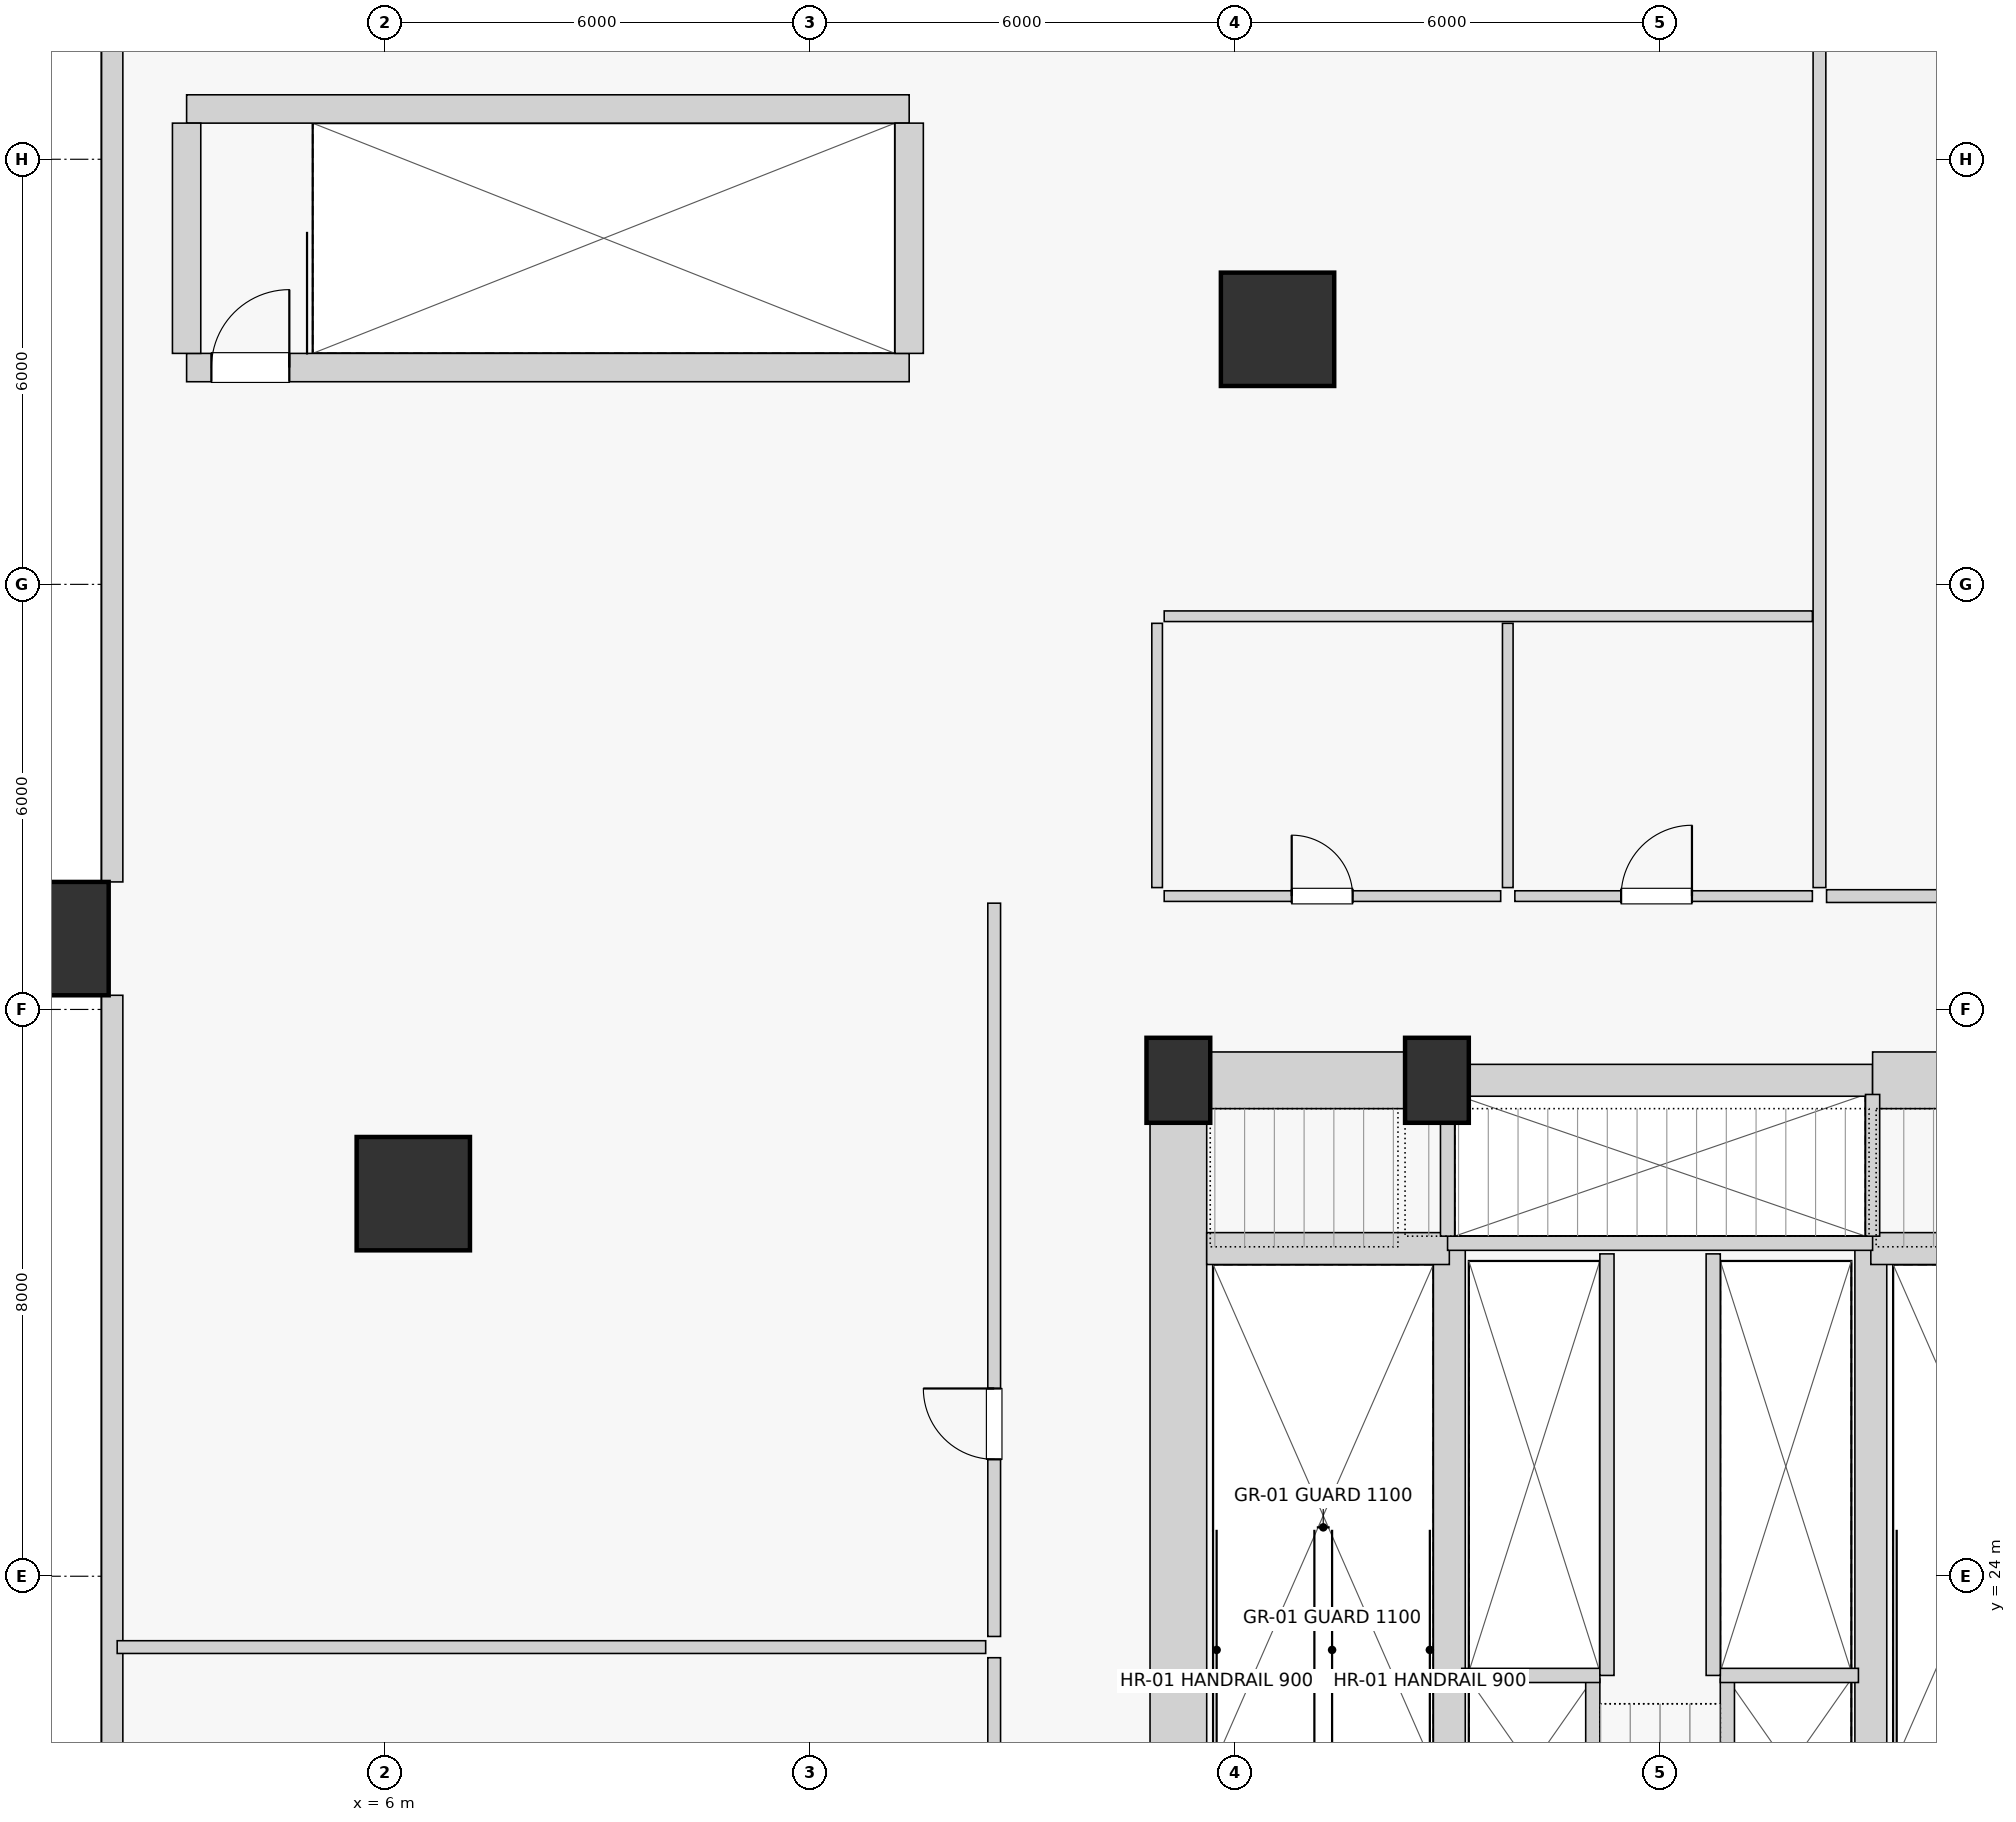
"""IFC4 building model, lengths in metres.
Left out: names, types, materials, properties, quantities, classifications, styles, units other than length and angle.
Written with IfcOpenShell. Run it as: python <this file> out.ifc"""

import sys

from ifc_helpers import new_model, si_unit, direction, frame, frame_2d, origin, origin_2d, place, context, subcontext, project, spatial, rectangle, extrude, source, transform, mapped, element, fill, save


model = new_model("IFC4")
c1 = context("Model", 3, precision=1e-05, world=origin(), true_north=direction((0.0, 1.0)))
c2 = subcontext(c1, "Body", "Model", "MODEL_VIEW")
j1 = project(units=[si_unit("LENGTHUNIT", "METRE"), si_unit("PLANEANGLEUNIT", "RADIAN")], contexts=[c1])
p1 = place(None, origin())
s1 = spatial("IfcSite", under=j1, at=p1, CompositionType="ELEMENT")
p2 = place(p1, origin())
s2 = spatial("IfcBuilding", under=s1, at=p2, CompositionType="ELEMENT")
p3 = place(p2, frame((0.0, 0.0, 18.4)))
s3 = spatial("IfcBuildingStorey", under=s2, at=p3, CompositionType="ELEMENT", Elevation=18.4)
for number, where, z_axis, x_axis in (
    (1, (17.2, 31.0, 0.0), (0.0, 0.0, 1.0), (1.0, 0.0, 0.0)),
    (2, (20.85, 31.0, 0.0), (0.0, 0.0, 1.0), (1.0, 0.0, 0.0)),
):
    element("IfcColumn", number, at=place(p3, frame(where, z_axis=z_axis, x_axis=x_axis)), inside=s3, PredefinedType="PILASTER", context=c2, shape_type="SweptSolid", body=[
        extrude(rectangle(XDim=0.9, YDim=1.2, at=origin_2d()), origin(), (0.0, 0.0, 1.0), 4.4),
    ])
for number, where, z_axis, x_axis in (
    (3, (1.3, 33.0, 0.0), (0.0, 0.0, 1.0), (1.0, 0.0, 0.0)),
    (4, (18.6, 41.6, 0.0), (0.0, 0.0, 1.0), (1.0, 0.0, 0.0)),
    (5, (6.4, 29.4, 0.0), (0.0, 0.0, 1.0), (1.0, 0.0, 0.0)),
):
    element("IfcColumn", number, at=place(p3, frame(where, z_axis=z_axis, x_axis=x_axis)), inside=s3, PredefinedType="COLUMN", context=c2, shape_type="SweptSolid", body=[
        extrude(rectangle(XDim=1.6, YDim=1.6, at=origin_2d()), origin(), (0.0, 0.0, 1.0), 4.4),
    ])
p4 = place(p3, frame((2.15, 45.7, 0.0), z_axis=(0.0, 0.0, 1.0), x_axis=(0.0, -1.0, 0.0)))
e6 = element("IfcWall", 6, at=p4, inside=s3, PredefinedType="SOLIDWALL", context=c2, shape_type="SweptSolid", body=[
    extrude(rectangle(XDim=11.9, YDim=0.3, at=frame_2d((5.95, 0.0))), origin(), (0.0, 0.0, 1.0), 2.95),
])
p5 = place(p4, frame((5.05, 0.0, 0.85)))
e7 = element("IfcOpeningElement", 7, at=p5, cuts=e6, PredefinedType="OPENING", context=c2, shape_type="SweptSolid", body=[
    extrude(rectangle(XDim=2.1, YDim=1.75, at=frame_2d((1.05, 0.875))), frame((0.0, 0.16, 0.0), z_axis=(0.0, -1.0, 0.0), x_axis=(1.0, 0.0, 0.0)), (0.0, 0.0, 1.0), 0.32),
])
p6 = place(p3, frame((2.15, 32.2, 0.0), z_axis=(0.0, 0.0, 1.0), x_axis=(0.0, -1.0, 0.0)))
e8 = element("IfcWall", 8, at=p6, inside=s3, PredefinedType="SOLIDWALL", context=c2, shape_type="SweptSolid", body=[
    extrude(rectangle(XDim=16.4, YDim=0.3, at=frame_2d((8.2, 0.0))), origin(), (0.0, 0.0, 1.0), 2.95),
])
p7 = place(p6, frame((7.15, 0.0, 0.85)))
e9 = element("IfcOpeningElement", 9, at=p7, cuts=e8, PredefinedType="OPENING", context=c2, shape_type="SweptSolid", body=[
    extrude(rectangle(XDim=2.1, YDim=1.75, at=frame_2d((1.05, 0.875))), frame((0.0, 0.16, 0.0), z_axis=(0.0, -1.0, 0.0), x_axis=(1.0, 0.0, 0.0)), (0.0, 0.0, 1.0), 0.32),
])
p8 = place(p3, frame((17.2, 16.8, 0.0), z_axis=(0.0, 0.0, 1.0), x_axis=(0.0, 1.0, 0.0)))
e10 = element("IfcWall", 10, at=p8, inside=s3, PredefinedType="SHEAR", context=c2, shape_type="SweptSolid", body=[
    extrude(rectangle(XDim=14.2, YDim=0.8, at=frame_2d((7.1, 0.0))), origin(), (0.0, 0.0, 1.0), 4.05),
])
p9 = place(p3, frame((17.2, 31.0, 0.0), z_axis=(0.0, 0.0, 1.0), x_axis=(1.0, 0.0, 0.0)))
e11 = element("IfcWall", 11, at=p9, inside=s3, PredefinedType="SHEAR", context=c2, shape_type="SweptSolid", body=[
    extrude(rectangle(XDim=3.8, YDim=0.8, at=frame_2d((1.9, 0.0))), origin(), (0.0, 0.0, 1.0), 4.05),
])
p10 = place(p3, frame((21.0, 31.0, 0.0), z_axis=(0.0, 0.0, 1.0), x_axis=(1.0, 0.0, 0.0)))
e12 = element("IfcWall", 12, at=p10, inside=s3, PredefinedType="SHEAR", context=c2, shape_type="SweptSolid", body=[
    extrude(rectangle(XDim=6.0, YDim=0.45, at=frame_2d((3.0, 0.0))), origin(), (0.0, 0.0, 1.0), 4.05),
])
p11 = place(p3, frame((27.0, 31.0, 0.0), z_axis=(0.0, 0.0, 1.0), x_axis=(1.0, 0.0, 0.0)))
e13 = element("IfcWall", 13, at=p11, inside=s3, PredefinedType="SHEAR", context=c2, shape_type="SweptSolid", body=[
    extrude(rectangle(XDim=3.8, YDim=0.8, at=frame_2d((1.9, 0.0))), origin(), (0.0, 0.0, 1.0), 4.05),
])
for number, where, z_axis, x_axis in (
    (14, (21.025, 19.8, 0.0), (0.0, 0.0, 1.0), (0.0, 1.0, 0.0)),
    (15, (26.975, 19.8, 0.0), (0.0, 0.0, 1.0), (0.0, 1.0, 0.0)),
):
    element("IfcWall", number, at=place(p3, frame(where, z_axis=z_axis, x_axis=x_axis)), inside=s3, PredefinedType="SHEAR", context=c2, shape_type="SweptSolid", body=[
        extrude(rectangle(XDim=8.825, YDim=0.45, at=frame_2d((4.413, 0.0))), origin(), (0.0, 0.0, 1.0), 4.05),
    ])
for number, where, z_axis, x_axis in (
    (16, (17.6, 28.625, 0.0), (0.0, 0.0, 1.0), (1.0, 0.0, 0.0)),
    (17, (26.975, 28.625, 0.0), (0.0, 0.0, 1.0), (1.0, 0.0, 0.0)),
):
    element("IfcWall", number, at=place(p3, frame(where, z_axis=z_axis, x_axis=x_axis)), inside=s3, PredefinedType="SHEAR", context=c2, shape_type="SweptSolid", body=[
        extrude(rectangle(XDim=3.425, YDim=0.45, at=frame_2d((1.712, 0.0))), origin(), (0.0, 0.0, 1.0), 4.05),
    ])
for number, where, z_axis, x_axis in (
    (18, (23.05, 16.95, 0.0), (0.0, 0.0, 1.0), (0.0, 1.0, 0.0)),
    (19, (24.95, 16.95, 0.0), (0.0, 0.0, 1.0), (0.0, 1.0, 0.0)),
):
    element("IfcWall", number, at=place(p3, frame(where, z_axis=z_axis, x_axis=x_axis)), inside=s3, PredefinedType="SOLIDWALL", context=c2, shape_type="SweptSolid", body=[
        extrude(rectangle(XDim=5.6, YDim=0.2, at=frame_2d((2.8, 0.0))), origin(), (0.0, 0.0, 1.0), 4.05),
    ])
for number, where, z_axis, x_axis in (
    (20, (21.2, 22.6, 0.0), (0.0, 0.0, 1.0), (1.0, 0.0, 0.0)),
    (21, (24.85, 22.6, 0.0), (0.0, 0.0, 1.0), (1.0, 0.0, 0.0)),
):
    element("IfcWall", number, at=place(p3, frame(where, z_axis=z_axis, x_axis=x_axis)), inside=s3, PredefinedType="SOLIDWALL", context=c2, shape_type="SweptSolid", body=[
        extrude(rectangle(XDim=1.95, YDim=0.2, at=frame_2d((0.975, 0.0))), origin(), (0.0, 0.0, 1.0), 4.05),
    ])
p12 = place(p3, frame((21.0, 28.7, 0.0), z_axis=(0.0, 0.0, 1.0), x_axis=(1.0, 0.0, 0.0)))
e22 = element("IfcWall", 22, at=p12, inside=s3, PredefinedType="SOLIDWALL", context=c2, shape_type="SweptSolid", body=[
    extrude(rectangle(XDim=6.0, YDim=0.2, at=frame_2d((3.0, 0.0))), origin(), (0.0, 0.0, 1.0), 4.05),
])
p13 = place(p3, frame((21.0, 28.8, 0.0), z_axis=(0.0, 0.0, 1.0), x_axis=(0.0, 1.0, 0.0)))
e23 = element("IfcWall", 23, at=p13, inside=s3, PredefinedType="SOLIDWALL", context=c2, shape_type="SweptSolid", body=[
    extrude(rectangle(XDim=1.6, YDim=0.2, at=frame_2d((0.8, 0.0))), origin(), (0.0, 0.0, 1.0), 4.05),
])
p14 = place(p3, frame((27.0, 28.8, 0.0), z_axis=(0.0, 0.0, 1.0), x_axis=(0.0, 1.0, 0.0)))
e24 = element("IfcWall", 24, at=p14, inside=s3, PredefinedType="SOLIDWALL", context=c2, shape_type="SweptSolid", body=[
    extrude(rectangle(XDim=2.0, YDim=0.2, at=frame_2d((1.0, 0.0))), origin(), (0.0, 0.0, 1.0), 4.05),
])
for number, where, z_axis, x_axis in (
    (25, (23.25, 22.6, 0.0), (0.0, 0.0, 1.0), (0.0, 1.0, 0.0)),
    (26, (24.75, 22.6, 0.0), (0.0, 0.0, 1.0), (0.0, 1.0, 0.0)),
):
    element("IfcWall", number, at=place(p3, frame(where, z_axis=z_axis, x_axis=x_axis)), inside=s3, PredefinedType="SOLIDWALL", context=c2, shape_type="SweptSolid", body=[
        extrude(rectangle(XDim=5.95, YDim=0.2, at=frame_2d((2.975, 0.0))), origin(), (0.0, 0.0, 1.0), 4.05),
    ])
p15 = place(p3, frame((3.2, 41.06, 0.0), z_axis=(0.0, 0.0, 1.0), x_axis=(1.0, 0.0, 0.0)))
e27 = element("IfcWall", 27, at=p15, inside=s3, PredefinedType="SHEAR", context=c2, shape_type="SweptSolid", body=[
    extrude(rectangle(XDim=10.2, YDim=0.4, at=frame_2d((5.1, 0.0))), origin(), (0.0, 0.0, 1.0), 4.05),
])
p16 = place(p15, frame((0.35, 0.0, 0.0)))
e28 = element("IfcOpeningElement", 28, at=p16, cuts=e27, PredefinedType="OPENING", context=c2, shape_type="SweptSolid", body=[
    extrude(rectangle(XDim=1.1, YDim=2.03, at=frame_2d((0.55, 1.015))), frame((0.0, 0.21, 0.0), z_axis=(0.0, -1.0, 0.0), x_axis=(1.0, 0.0, 0.0)), (0.0, 0.0, 1.0), 0.42),
])
p17 = place(p3, frame((3.2, 44.71, 0.0), z_axis=(0.0, 0.0, 1.0), x_axis=(1.0, 0.0, 0.0)))
e29 = element("IfcWall", 29, at=p17, inside=s3, PredefinedType="SHEAR", context=c2, shape_type="SweptSolid", body=[
    extrude(rectangle(XDim=10.2, YDim=0.4, at=frame_2d((5.1, 0.0))), origin(), (0.0, 0.0, 1.0), 4.05),
])
for number, where, z_axis, x_axis in (
    (30, (3.2, 41.26, 0.0), (0.0, 0.0, 1.0), (0.0, 1.0, 0.0)),
    (31, (13.4, 41.26, 0.0), (0.0, 0.0, 1.0), (0.0, 1.0, 0.0)),
):
    element("IfcWall", number, at=place(p3, frame(where, z_axis=z_axis, x_axis=x_axis)), inside=s3, PredefinedType="SHEAR", context=c2, shape_type="SweptSolid", body=[
        extrude(rectangle(XDim=3.25, YDim=0.4, at=frame_2d((1.625, 0.0))), origin(), (0.0, 0.0, 1.0), 4.05),
    ])
p18 = place(p3, frame((14.6, 14.3, 0.0), z_axis=(0.0, 0.0, 1.0), x_axis=(0.0, 1.0, 0.0)))
e32 = element("IfcWall", 32, at=p18, inside=s3, PredefinedType="PARTITIONING", context=c2, shape_type="SweptSolid", body=[
    extrude(rectangle(XDim=8.55, YDim=0.18, at=frame_2d((4.275, 0.0))), origin(), (0.0, 0.0, 1.0), 4.05),
])
p19 = place(p18, frame((2.5, 0.0, 0.0)))
e33 = element("IfcOpeningElement", 33, at=p19, cuts=e32, PredefinedType="OPENING", context=c2, shape_type="SweptSolid", body=[
    extrude(rectangle(XDim=1.0, YDim=2.01, at=frame_2d((0.5, 1.005))), frame((0.0, 0.1, 0.0), z_axis=(0.0, -1.0, 0.0), x_axis=(1.0, 0.0, 0.0)), (0.0, 0.0, 1.0), 0.2),
])
p20 = place(p3, frame((14.6, 23.15, 0.0), z_axis=(0.0, 0.0, 1.0), x_axis=(0.0, 1.0, 0.0)))
e34 = element("IfcWall", 34, at=p20, inside=s3, PredefinedType="PARTITIONING", context=c2, shape_type="SweptSolid", body=[
    extrude(rectangle(XDim=10.35, YDim=0.18, at=frame_2d((5.175, 0.0))), origin(), (0.0, 0.0, 1.0), 4.05),
])
p21 = place(p20, frame((2.5, 0.0, 0.0)))
e35 = element("IfcOpeningElement", 35, at=p21, cuts=e34, PredefinedType="OPENING", context=c2, shape_type="SweptSolid", body=[
    extrude(rectangle(XDim=1.0, YDim=2.01, at=frame_2d((0.5, 1.005))), frame((0.0, 0.1, 0.0), z_axis=(0.0, -1.0, 0.0), x_axis=(1.0, 0.0, 0.0)), (0.0, 0.0, 1.0), 0.2),
])
p22 = place(p3, frame((2.22, 23.0, 0.0), z_axis=(0.0, 0.0, 1.0), x_axis=(1.0, 0.0, 0.0)))
e36 = element("IfcWall", 36, at=p22, inside=s3, PredefinedType="PARTITIONING", context=c2, shape_type="SweptSolid", body=[
    extrude(rectangle(XDim=12.26, YDim=0.18, at=frame_2d((6.13, 0.0))), origin(), (0.0, 0.0, 1.0), 4.05),
])
p23 = place(p3, frame((17.0, 33.6, 0.0), z_axis=(0.0, 0.0, 1.0), x_axis=(1.0, 0.0, 0.0)))
e37 = element("IfcWall", 37, at=p23, inside=s3, PredefinedType="PARTITIONING", context=c2, shape_type="SweptSolid", body=[
    extrude(rectangle(XDim=4.75, YDim=0.15, at=frame_2d((2.375, 0.0))), origin(), (0.0, 0.0, 1.0), 4.05),
])
p24 = place(p23, frame((1.8, 0.0, 0.0)))
e38 = element("IfcOpeningElement", 38, at=p24, cuts=e37, PredefinedType="OPENING", context=c2, shape_type="SweptSolid", body=[
    extrude(rectangle(XDim=0.86, YDim=2.01, at=frame_2d((0.43, 1.005))), frame((0.0, 0.085, 0.0), z_axis=(0.0, -1.0, 0.0), x_axis=(1.0, 0.0, 0.0)), (0.0, 0.0, 1.0), 0.17),
])
p25 = place(p3, frame((21.95, 33.6, 0.0), z_axis=(0.0, 0.0, 1.0), x_axis=(1.0, 0.0, 0.0)))
e39 = element("IfcWall", 39, at=p25, inside=s3, PredefinedType="PARTITIONING", context=c2, shape_type="SweptSolid", body=[
    extrude(rectangle(XDim=4.2, YDim=0.15, at=frame_2d((2.1, 0.0))), origin(), (0.0, 0.0, 1.0), 4.05),
])
p26 = place(p25, frame((1.5, 0.0, 0.0)))
e40 = element("IfcOpeningElement", 40, at=p26, cuts=e39, PredefinedType="OPENING", context=c2, shape_type="SweptSolid", body=[
    extrude(rectangle(XDim=1.0, YDim=2.01, at=frame_2d((0.5, 1.005))), frame((0.0, 0.085, 0.0), z_axis=(0.0, -1.0, 0.0), x_axis=(1.0, 0.0, 0.0)), (0.0, 0.0, 1.0), 0.17),
])
p27 = place(p3, frame((26.35, 33.6, 0.0), z_axis=(0.0, 0.0, 1.0), x_axis=(1.0, 0.0, 0.0)))
e41 = element("IfcWall", 41, at=p27, inside=s3, PredefinedType="PARTITIONING", context=c2, shape_type="SweptSolid", body=[
    extrude(rectangle(XDim=6.9, YDim=0.18, at=frame_2d((3.45, 0.0))), origin(), (0.0, 0.0, 1.0), 4.05),
])
p28 = place(p27, frame((2.5, 0.0, 0.0)))
e42 = element("IfcOpeningElement", 42, at=p28, cuts=e41, PredefinedType="OPENING", context=c2, shape_type="SweptSolid", body=[
    extrude(rectangle(XDim=1.0, YDim=2.01, at=frame_2d((0.5, 1.005))), frame((0.0, 0.1, 0.0), z_axis=(0.0, -1.0, 0.0), x_axis=(1.0, 0.0, 0.0)), (0.0, 0.0, 1.0), 0.2),
])
for number, where, z_axis, x_axis in (
    (43, (16.9, 33.72, 0.0), (0.0, 0.0, 1.0), (0.0, 1.0, 0.0)),
    (44, (21.85, 33.72, 0.0), (0.0, 0.0, 1.0), (0.0, 1.0, 0.0)),
):
    element("IfcWall", number, at=place(p3, frame(where, z_axis=z_axis, x_axis=x_axis)), inside=s3, PredefinedType="PARTITIONING", context=c2, shape_type="SweptSolid", body=[
        extrude(rectangle(XDim=3.73, YDim=0.15, at=frame_2d((1.865, 0.0))), origin(), (0.0, 0.0, 1.0), 4.05),
    ])
p29 = place(p3, frame((26.25, 33.72, 0.0), z_axis=(0.0, 0.0, 1.0), x_axis=(0.0, 1.0, 0.0)))
e45 = element("IfcWall", 45, at=p29, inside=s3, PredefinedType="PARTITIONING", context=c2, shape_type="SweptSolid", body=[
    extrude(rectangle(XDim=12.06, YDim=0.18, at=frame_2d((6.03, 0.0))), origin(), (0.0, 0.0, 1.0), 4.05),
])
p30 = place(p3, frame((17.0, 37.55, 0.0), z_axis=(0.0, 0.0, 1.0), x_axis=(1.0, 0.0, 0.0)))
e46 = element("IfcWall", 46, at=p30, inside=s3, PredefinedType="PARTITIONING", context=c2, shape_type="SweptSolid", body=[
    extrude(rectangle(XDim=9.15, YDim=0.15, at=frame_2d((4.575, 0.0))), origin(), (0.0, 0.0, 1.0), 4.05),
])
m1 = source(origin(), c2, "Body", "SweptSolid", [
    extrude(rectangle(XDim=2.1, YDim=1.75, at=frame_2d((1.05, 0.875))), frame((0.0, 0.03, 0.0), z_axis=(0.0, -1.0, 0.0), x_axis=(1.0, 0.0, 0.0)), (0.0, 0.0, 1.0), 0.06),
])
p31 = place(p5, origin())
e47 = element("IfcWindow", 47, at=p31, inside=s3, PartitioningType="DOUBLE_PANEL_VERTICAL", PredefinedType="WINDOW", context=c2, shape_type="MappedRepresentation", body=[
    mapped(m1, transform((0.0, 0.0, 0.0), scale=1.0)),
])
fill(e7, e47)
p32 = place(p7, origin())
e48 = element("IfcWindow", 48, at=p32, inside=s3, PartitioningType="DOUBLE_PANEL_VERTICAL", PredefinedType="WINDOW", context=c2, shape_type="MappedRepresentation", body=[
    mapped(m1, transform((0.0, 0.0, 0.0), scale=1.0)),
])
fill(e9, e48)
m2 = source(origin(), c2, "Body", "SweptSolid", [
    extrude(rectangle(XDim=1.1, YDim=2.03, at=frame_2d((0.55, 1.015))), frame((0.0, 0.025, 0.0), z_axis=(0.0, -1.0, 0.0), x_axis=(1.0, 0.0, 0.0)), (0.0, 0.0, 1.0), 0.05),
])
p33 = place(p16, origin())
e49 = element("IfcDoor", 49, at=p33, inside=s3, OperationType="SINGLE_SWING_RIGHT", PredefinedType="DOOR", context=c2, shape_type="MappedRepresentation", body=[
    mapped(m2, transform((0.0, 0.0, 0.0), scale=1.0)),
])
fill(e28, e49)
m3 = source(origin(), c2, "Body", "SweptSolid", [
    extrude(rectangle(XDim=1.0, YDim=2.01, at=frame_2d((0.5, 1.005))), frame((0.0, 0.025, 0.0), z_axis=(0.0, -1.0, 0.0), x_axis=(1.0, 0.0, 0.0)), (0.0, 0.0, 1.0), 0.05),
])
p34 = place(p21, origin())
e50 = element("IfcDoor", 50, at=p34, inside=s3, OperationType="SINGLE_SWING_RIGHT", PredefinedType="DOOR", context=c2, shape_type="MappedRepresentation", body=[
    mapped(m3, transform((0.0, 0.0, 0.0), scale=1.0)),
])
fill(e35, e50)
m4 = source(origin(), c2, "Body", "SweptSolid", [
    extrude(rectangle(XDim=0.86, YDim=2.01, at=frame_2d((0.43, 1.005))), frame((0.0, 0.025, 0.0), z_axis=(0.0, -1.0, 0.0), x_axis=(1.0, 0.0, 0.0)), (0.0, 0.0, 1.0), 0.05),
])
p35 = place(p24, origin())
e51 = element("IfcDoor", 51, at=p35, inside=s3, OperationType="SINGLE_SWING_LEFT", PredefinedType="DOOR", context=c2, shape_type="MappedRepresentation", body=[
    mapped(m4, transform((0.0, 0.0, 0.0), scale=1.0)),
])
fill(e38, e51)
p36 = place(p26, origin())
e52 = element("IfcDoor", 52, at=p36, inside=s3, OperationType="SINGLE_SWING_RIGHT", PredefinedType="DOOR", context=c2, shape_type="MappedRepresentation", body=[
    mapped(m3, transform((0.0, 0.0, 0.0), scale=1.0)),
])
fill(e40, e52)
save(model, sys.argv[1])
